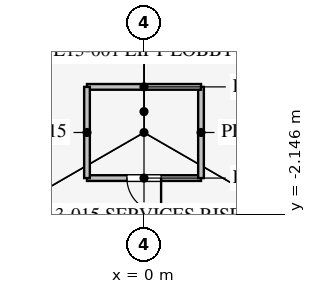
"""IFC4 building model, lengths in metres.
Left out: names, types, materials, properties, quantities, classifications, styles, units other than length and angle.
Written with IfcOpenShell. Run it as: python <this file> out.ifc"""

import sys

from ifc_helpers import new_model, si_unit, direction, frame, frame_2d, origin, place, context, subcontext, project, spatial, rectangle, extrude, element, fill, save


model = new_model("IFC4")
c1 = context("Model", 3, precision=1e-05, world=origin(), true_north=direction((0.0, 1.0)))
c2 = subcontext(c1, "Body", "Model", "MODEL_VIEW")
j1 = project(units=[si_unit("LENGTHUNIT", "METRE"), si_unit("PLANEANGLEUNIT", "RADIAN")], contexts=[c1])
p1 = place(None, origin())
s1 = spatial("IfcSite", under=j1, at=p1, CompositionType="ELEMENT")
p2 = place(p1, origin())
s2 = spatial("IfcBuilding", under=s1, at=p2, CompositionType="ELEMENT")
p3 = place(p2, frame((0.0, 0.0, 58.5)))
s3 = spatial("IfcBuildingStorey", under=s2, at=p3, CompositionType="ELEMENT", Elevation=58.5)
p4 = place(p3, frame((-1.5, -1.2, 0.0), z_axis=(0.0, 0.0, 1.0), x_axis=(1.0, 0.0, 0.0)))
e1 = element("IfcWall", 1, at=p4, inside=s3, PredefinedType="PARTITIONING", context=c2, shape_type="SweptSolid", body=[
    extrude(rectangle(XDim=3.0, YDim=0.15, at=frame_2d((1.5, 0.0))), origin(), (0.0, 0.0, 1.0), 4.0),
])
p5 = place(p4, frame((1.05, 0.0, 0.0)))
e2 = element("IfcOpeningElement", 2, at=p5, cuts=e1, PredefinedType="OPENING", context=c2, shape_type="SweptSolid", body=[
    extrude(rectangle(XDim=0.9, YDim=2.1, at=frame_2d((0.45, 1.05))), frame((0.0, 0.085, 0.0), z_axis=(0.0, -1.0, 0.0), x_axis=(1.0, 0.0, 0.0)), (0.0, 0.0, 1.0), 0.17),
])
p6 = place(p3, frame((1.5, -1.2, 0.0), z_axis=(0.0, 0.0, 1.0), x_axis=(0.0, 1.0, 0.0)))
e3 = element("IfcWall", 3, at=p6, inside=s3, PredefinedType="PARTITIONING", context=c2, shape_type="SweptSolid", body=[
    extrude(rectangle(XDim=2.4, YDim=0.15, at=frame_2d((1.2, 0.0))), origin(), (0.0, 0.0, 1.0), 4.0),
])
p7 = place(p3, frame((1.5, 1.2, 0.0), z_axis=(0.0, 0.0, 1.0), x_axis=(-1.0, 0.0, 0.0)))
e4 = element("IfcWall", 4, at=p7, inside=s3, PredefinedType="PARTITIONING", context=c2, shape_type="SweptSolid", body=[
    extrude(rectangle(XDim=3.0, YDim=0.15, at=frame_2d((1.5, 0.0))), origin(), (0.0, 0.0, 1.0), 4.0),
])
p8 = place(p3, frame((-1.5, 1.2, 0.0), z_axis=(0.0, 0.0, 1.0), x_axis=(0.0, -1.0, 0.0)))
e5 = element("IfcWall", 5, at=p8, inside=s3, PredefinedType="PARTITIONING", context=c2, shape_type="SweptSolid", body=[
    extrude(rectangle(XDim=2.4, YDim=0.15, at=frame_2d((1.2, 0.0))), origin(), (0.0, 0.0, 1.0), 4.0),
])
p9 = place(p3, frame((-0.016, 30.491, 0.0), z_axis=(0.0, 0.0, 1.0), x_axis=(-0.50000091641, -0.866024874695, 0.0)))
e6 = element("IfcWall", 6, at=p9, inside=s3, PredefinedType="PARTITIONING", context=c2, shape_type="SweptSolid", body=[
    extrude(rectangle(XDim=52.796, YDim=0.12, at=frame_2d((26.398, 0.0))), origin(), (0.0, 0.0, 1.0), 2.9),
])
p10 = place(p9, frame((10.2, 0.0, 0.15)))
e7 = element("IfcOpeningElement", 7, at=p10, cuts=e6, PredefinedType="OPENING", context=c2, shape_type="SweptSolid", body=[
    extrude(rectangle(XDim=1.8, YDim=2.1, at=frame_2d((0.9, 1.05))), frame((0.0, 0.07, 0.0), z_axis=(0.0, -1.0, 0.0), x_axis=(1.0, 0.0, 0.0)), (0.0, 0.0, 1.0), 0.14),
])
p11 = place(p9, frame((40.8, 0.0, 0.15)))
e8 = element("IfcOpeningElement", 8, at=p11, cuts=e6, PredefinedType="OPENING", context=c2, shape_type="SweptSolid", body=[
    extrude(rectangle(XDim=1.8, YDim=2.1, at=frame_2d((0.9, 1.05))), frame((0.0, 0.07, 0.0), z_axis=(0.0, -1.0, 0.0), x_axis=(1.0, 0.0, 0.0)), (0.0, 0.0, 1.0), 0.14),
])
p12 = place(p5, frame((0.9, 0.0, 0.0), z_axis=(0.0, 0.0, 1.0), x_axis=(-1.0, 0.0, 0.0)))
e9 = element("IfcDoor", 9, at=p12, inside=s3, OperationType="SINGLE_SWING_LEFT", PredefinedType="DOOR", context=c2, shape_type="SweptSolid", body=[
    extrude(rectangle(XDim=0.9, YDim=2.1, at=frame_2d((0.45, 1.05))), frame((0.0, 0.025, 0.0), z_axis=(0.0, -1.0, 0.0), x_axis=(1.0, 0.0, 0.0)), (0.0, 0.0, 1.0), 0.05),
])
fill(e2, e9)
save(model, sys.argv[1])
